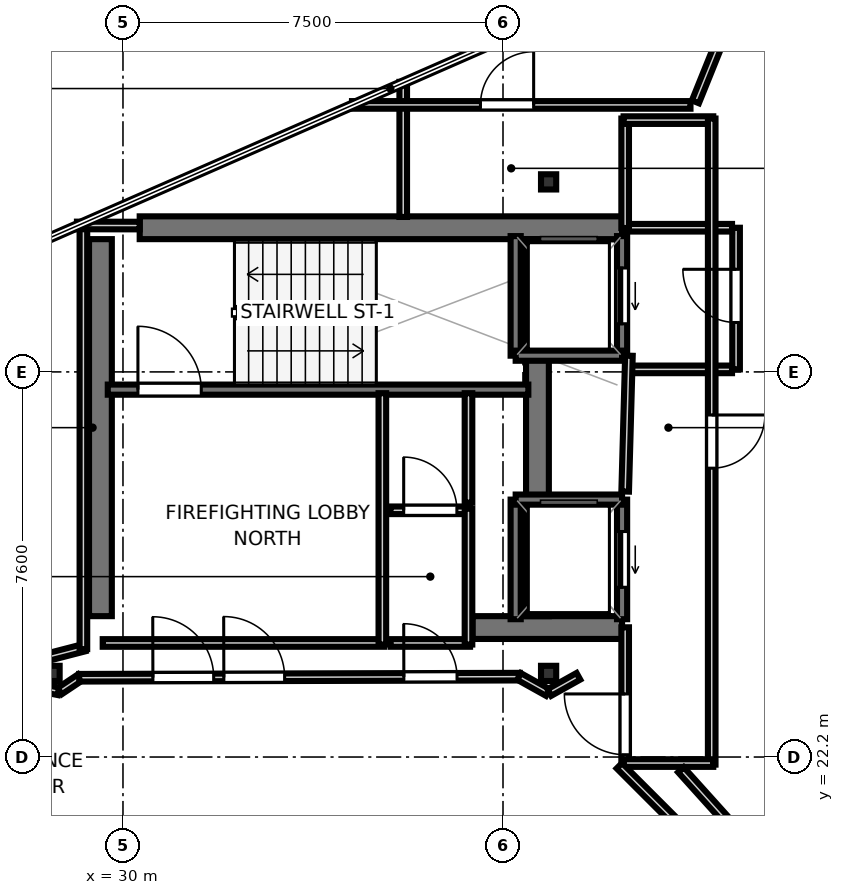
"""IFC4 building model, lengths in metres.
Left out: names, types, materials, properties, quantities, classifications, styles, units other than length and angle.
Written with IfcOpenShell. Run it as: python <this file> out.ifc"""

import sys

from ifc_helpers import new_model, si_unit, direction, frame, frame_2d, origin, origin_2d, place, context, subcontext, project, spatial, rectangle, i_section, extrude, element, fill, save


model = new_model("IFC4")
c1 = context("Model", 3, precision=1e-05, world=origin(), true_north=direction((0.0, 1.0)))
c2 = subcontext(c1, "Body", "Model", "MODEL_VIEW")
j1 = project(units=[si_unit("LENGTHUNIT", "METRE"), si_unit("PLANEANGLEUNIT", "RADIAN")], contexts=[c1])
p1 = place(None, origin())
s1 = spatial("IfcSite", under=j1, at=p1, CompositionType="ELEMENT")
p2 = place(p1, origin())
s2 = spatial("IfcBuilding", under=s1, at=p2, CompositionType="ELEMENT")
p3 = place(p2, frame((0.0, 0.0, 367.55)))
s3 = spatial("IfcBuildingStorey", under=s2, at=p3, CompositionType="ELEMENT", Elevation=367.55)
p4 = place(p3, frame((30.33, 32.645, 0.0), z_axis=(0.0, 0.0, 1.0), x_axis=(1.0, 0.0, 0.0)))
e1 = element("IfcWall", 1, at=p4, inside=s3, PredefinedType="SHEAR", context=c2, shape_type="SweptSolid", body=[
    extrude(rectangle(XDim=9.52, YDim=0.45, at=frame_2d((4.76, 0.0))), origin(), (0.0, 0.0, 1.0), 3.55),
])
p5 = place(p3, frame((36.9, 24.755, 0.0), z_axis=(0.0, 0.0, 1.0), x_axis=(1.0, 0.0, 0.0)))
e2 = element("IfcWall", 2, at=p5, inside=s3, PredefinedType="SHEAR", context=c2, shape_type="SweptSolid", body=[
    extrude(rectangle(XDim=2.95, YDim=0.45, at=frame_2d((1.475, 0.0))), origin(), (0.0, 0.0, 1.0), 3.55),
])
for number, where, z_axis, x_axis in (
    (3, (29.555, 24.98, 0.0), (0.0, 0.0, 1.0), (0.0, 1.0, 0.0)),
    (4, (38.18, 24.98, 0.0), (0.0, 0.0, 1.0), (0.0, 1.0, 0.0)),
):
    element("IfcWall", number, at=place(p3, frame(where, z_axis=z_axis, x_axis=x_axis)), inside=s3, PredefinedType="SHEAR", context=c2, shape_type="SweptSolid", body=[
        extrude(rectangle(XDim=7.44, YDim=0.45, at=frame_2d((3.72, 0.0))), origin(), (0.0, 0.0, 1.0), 3.55),
    ])
for number, where, z_axis, x_axis in (
    (5, (28.6, 23.85, 0.0), (0.0, 0.0, 1.0), (1.0, 0.0, 0.0)),
    (6, (38.4, 33.55, 0.0), (0.0, 0.0, 1.0), (1.0, 0.0, 0.0)),
    (7, (38.4, 23.85, 0.0), (0.0, 0.0, 1.0), (1.0, 0.0, 0.0)),
):
    element("IfcColumn", number, at=place(p3, frame(where, z_axis=z_axis, x_axis=x_axis)), inside=s3, PredefinedType="COLUMN", context=c2, shape_type="SweptSolid", body=[
        extrude(i_section(OverallWidth=0.3, OverallDepth=0.3, WebThickness=0.01, FlangeThickness=0.015, at=origin_2d()), origin(), (0.0, 0.0, 1.0), 3.75),
    ])
p6 = place(p3, frame((29.7, 29.45, 0.0), z_axis=(0.0, 0.0, 1.0), x_axis=(1.0, 0.0, 0.0)))
e8 = element("IfcWall", 8, at=p6, inside=s3, PredefinedType="SOLIDWALL", context=c2, shape_type="SweptSolid", body=[
    extrude(rectangle(XDim=8.3, YDim=0.2, at=frame_2d((4.15, 0.0))), origin(), (0.0, 0.0, 1.0), 3.55),
])
p7 = place(p6, frame((0.595, 0.0, 0.0)))
e9 = element("IfcOpeningElement", 9, at=p7, cuts=e8, PredefinedType="OPENING", context=c2, shape_type="SweptSolid", body=[
    extrude(rectangle(XDim=1.25, YDim=2.15, at=frame_2d((0.625, 1.075))), frame((0.0, 0.11, 0.0), z_axis=(0.0, -1.0, 0.0), x_axis=(1.0, 0.0, 0.0)), (0.0, 0.0, 1.0), 0.22),
])
p8 = place(p3, frame((39.85, 30.12, 0.0), z_axis=(0.0, 0.0, 1.0), x_axis=(0.0, 1.0, 0.0)))
e10 = element("IfcWall", 10, at=p8, inside=s3, PredefinedType="SOLIDWALL", context=c2, shape_type="SweptSolid", body=[
    extrude(rectangle(XDim=2.36, YDim=0.2, at=frame_2d((1.18, 0.0))), origin(), (0.0, 0.0, 1.0), 3.55),
])
p9 = place(p8, frame((0.63, 0.0, 0.0)))
e11 = element("IfcOpeningElement", 11, at=p9, cuts=e10, PredefinedType="OPENING", context=c2, shape_type="SweptSolid", body=[
    extrude(rectangle(XDim=1.1, YDim=2.15, at=frame_2d((0.55, 1.075))), frame((0.0, 0.11, 0.0), z_axis=(0.0, -1.0, 0.0), x_axis=(1.0, 0.0, 0.0)), (0.0, 0.0, 1.0), 0.22),
])
p10 = place(p3, frame((37.75, 30.12, 0.0), z_axis=(0.0, 0.0, 1.0), x_axis=(0.0, 1.0, 0.0)))
e12 = element("IfcWall", 12, at=p10, inside=s3, PredefinedType="SOLIDWALL", context=c2, shape_type="SweptSolid", body=[
    extrude(rectangle(XDim=2.36, YDim=0.2, at=frame_2d((1.18, 0.0))), origin(), (0.0, 0.0, 1.0), 3.55),
])
p11 = place(p3, frame((37.75, 30.12, 0.0), z_axis=(0.0, 0.0, 1.0), x_axis=(1.0, 0.0, 0.0)))
e13 = element("IfcWall", 13, at=p11, inside=s3, PredefinedType="SOLIDWALL", context=c2, shape_type="SweptSolid", body=[
    extrude(rectangle(XDim=2.1, YDim=0.2, at=frame_2d((1.05, 0.0))), origin(), (0.0, 0.0, 1.0), 3.55),
])
p12 = place(p3, frame((39.85, 24.92, 0.0), z_axis=(0.0, 0.0, 1.0), x_axis=(0.0, 1.0, 0.0)))
e14 = element("IfcWall", 14, at=p12, inside=s3, PredefinedType="SOLIDWALL", context=c2, shape_type="SweptSolid", body=[
    extrude(rectangle(XDim=2.36, YDim=0.2, at=frame_2d((1.18, 0.0))), origin(), (0.0, 0.0, 1.0), 3.55),
])
p13 = place(p12, frame((0.63, 0.0, 0.0)))
e15 = element("IfcOpeningElement", 15, at=p13, cuts=e14, PredefinedType="OPENING", context=c2, shape_type="SweptSolid", body=[
    extrude(rectangle(XDim=1.1, YDim=2.15, at=frame_2d((0.55, 1.075))), frame((0.0, 0.11, 0.0), z_axis=(0.0, -1.0, 0.0), x_axis=(1.0, 0.0, 0.0)), (0.0, 0.0, 1.0), 0.22),
])
p14 = place(p3, frame((37.75, 24.92, 0.0), z_axis=(0.0, 0.0, 1.0), x_axis=(0.0, 1.0, 0.0)))
e16 = element("IfcWall", 16, at=p14, inside=s3, PredefinedType="SOLIDWALL", context=c2, shape_type="SweptSolid", body=[
    extrude(rectangle(XDim=2.36, YDim=0.2, at=frame_2d((1.18, 0.0))), origin(), (0.0, 0.0, 1.0), 3.55),
])
p15 = place(p3, frame((37.75, 27.28, 0.0), z_axis=(0.0, 0.0, 1.0), x_axis=(1.0, 0.0, 0.0)))
e17 = element("IfcWall", 17, at=p15, inside=s3, PredefinedType="SOLIDWALL", context=c2, shape_type="SweptSolid", body=[
    extrude(rectangle(XDim=2.1, YDim=0.2, at=frame_2d((1.05, 0.0))), origin(), (0.0, 0.0, 1.0), 3.55),
])
p16 = place(p3, frame((42.1, 29.85, 0.0), z_axis=(0.0, 0.0, 1.0), x_axis=(0.0, 1.0, 0.0)))
e18 = element("IfcWall", 18, at=p16, inside=s3, PredefinedType="PARTITIONING", context=c2, shape_type="SweptSolid", body=[
    extrude(rectangle(XDim=2.795, YDim=0.15, at=frame_2d((1.397, 0.0))), origin(), (0.0, 0.0, 1.0), 2.87),
])
p17 = place(p16, frame((0.925, 0.0, 0.0)))
e19 = element("IfcOpeningElement", 19, at=p17, cuts=e18, PredefinedType="OPENING", context=c2, shape_type="SweptSolid", body=[
    extrude(rectangle(XDim=1.05, YDim=2.15, at=frame_2d((0.525, 1.075))), frame((0.0, 0.085, 0.0), z_axis=(0.0, -1.0, 0.0), x_axis=(1.0, 0.0, 0.0)), (0.0, 0.0, 1.0), 0.17),
])
for number, where, z_axis, x_axis in (
    (20, (39.96, 29.85, 0.0), (0.0, 0.0, 1.0), (1.0, 0.0, 0.0)),
    (21, (39.96, 32.645, 0.0), (0.0, 0.0, 1.0), (1.0, 0.0, 0.0)),
):
    element("IfcWall", number, at=place(p3, frame(where, z_axis=z_axis, x_axis=x_axis)), inside=s3, PredefinedType="PARTITIONING", context=c2, shape_type="SweptSolid", body=[
        extrude(rectangle(XDim=2.06, YDim=0.15, at=frame_2d((1.03, 0.0))), origin(), (0.0, 0.0, 1.0), 2.87),
    ])
p18 = place(p3, frame((35.15, 24.451, 0.0), z_axis=(0.0, 0.0, 1.0), x_axis=(-1.0, 0.0, 0.0)))
e22 = element("IfcWall", 22, at=p18, inside=s3, PredefinedType="PARTITIONING", context=c2, shape_type="SweptSolid", body=[
    extrude(rectangle(XDim=5.55, YDim=0.15, at=frame_2d((2.775, 0.0))), origin(), (0.0, 0.0, 1.0), 2.87),
])
p19 = place(p3, frame((35.119, 29.38, 0.0), z_axis=(0.0, 0.0, 1.0), x_axis=(0.0, -1.0, 0.0)))
e23 = element("IfcWall", 23, at=p19, inside=s3, PredefinedType="PARTITIONING", context=c2, shape_type="SweptSolid", body=[
    extrude(rectangle(XDim=4.96, YDim=0.15, at=frame_2d((2.48, 0.0))), origin(), (0.0, 0.0, 1.0), 2.08),
])
p20 = place(p3, frame((39.911, 22.05, 0.0), z_axis=(0.0, 0.0, 1.0), x_axis=(0.0, 1.0, 0.0)))
e24 = element("IfcWall", 24, at=p20, inside=s3, PredefinedType="PARTITIONING", context=c2, shape_type="SweptSolid", body=[
    extrude(rectangle(XDim=2.71, YDim=0.15, at=frame_2d((1.355, 0.0))), origin(), (0.0, 0.0, 1.0), 2.87),
])
p21 = place(p20, frame((0.195, 0.0, 0.0)))
e25 = element("IfcOpeningElement", 25, at=p21, cuts=e24, PredefinedType="OPENING", context=c2, shape_type="SweptSolid", body=[
    extrude(rectangle(XDim=1.2, YDim=2.15, at=frame_2d((0.6, 1.075))), frame((0.0, 0.085, 0.0), z_axis=(0.0, -1.0, 0.0), x_axis=(1.0, 0.0, 0.0)), (0.0, 0.0, 1.0), 0.17),
])
p22 = place(p3, frame((39.911, 27.439, 0.0), z_axis=(0.0, 0.0, 1.0), x_axis=(0.027673579092, 0.999617013171, 0.0)))
e26 = element("IfcWall", 26, at=p22, inside=s3, PredefinedType="PARTITIONING", context=c2, shape_type="SweptSolid", body=[
    extrude(rectangle(XDim=2.682, YDim=0.15, at=frame_2d((1.341, 0.0))), origin(), (0.0, 0.0, 1.0), 2.87),
])
p23 = place(p3, frame((39.911, 32.64, 0.0), z_axis=(0.0, 0.0, 1.0), x_axis=(0.0, 1.0, 0.0)))
e27 = element("IfcWall", 27, at=p23, inside=s3, PredefinedType="PARTITIONING", context=c2, shape_type="SweptSolid", body=[
    extrude(rectangle(XDim=2.16, YDim=0.15, at=frame_2d((1.08, 0.0))), origin(), (0.0, 0.0, 1.0), 2.87),
])
p24 = place(p3, frame((39.88, 34.769, 0.0), z_axis=(0.0, 0.0, 1.0), x_axis=(1.0, 0.0, 0.0)))
e28 = element("IfcWall", 28, at=p24, inside=s3, PredefinedType="PARTITIONING", context=c2, shape_type="SweptSolid", body=[
    extrude(rectangle(XDim=1.77, YDim=0.15, at=frame_2d((0.885, 0.0))), origin(), (0.0, 0.0, 1.0), 2.87),
])
p25 = place(p3, frame((41.619, 34.8, 0.0), z_axis=(0.0, 0.0, 1.0), x_axis=(0.0, -1.0, 0.0)))
e29 = element("IfcWall", 29, at=p25, inside=s3, PredefinedType="PARTITIONING", context=c2, shape_type="SweptSolid", body=[
    extrude(rectangle(XDim=12.75, YDim=0.15, at=frame_2d((6.375, 0.0))), origin(), (0.0, 0.0, 1.0), 2.87),
])
p26 = place(p25, frame((5.85, 0.0, 0.0)))
e30 = element("IfcOpeningElement", 30, at=p26, cuts=e29, PredefinedType="OPENING", context=c2, shape_type="SweptSolid", body=[
    extrude(rectangle(XDim=1.05, YDim=2.15, at=frame_2d((0.525, 1.075))), frame((0.0, 0.085, 0.0), z_axis=(0.0, -1.0, 0.0), x_axis=(1.0, 0.0, 0.0)), (0.0, 0.0, 1.0), 0.17),
])
p27 = place(p3, frame((41.65, 22.081, 0.0), z_axis=(0.0, 0.0, 1.0), x_axis=(-1.0, 0.0, 0.0)))
e31 = element("IfcWall", 31, at=p27, inside=s3, PredefinedType="PARTITIONING", context=c2, shape_type="SweptSolid", body=[
    extrude(rectangle(XDim=1.77, YDim=0.15, at=frame_2d((0.885, 0.0))), origin(), (0.0, 0.0, 1.0), 2.87),
])
p28 = place(p3, frame((36.85, 24.451, 0.0), z_axis=(0.0, 0.0, 1.0), x_axis=(-1.0, 0.0, 0.0)))
e32 = element("IfcWall", 32, at=p28, inside=s3, PredefinedType="PARTITIONING", context=c2, shape_type="SweptSolid", body=[
    extrude(rectangle(XDim=1.57, YDim=0.15, at=frame_2d((0.785, 0.0))), origin(), (0.0, 0.0, 1.0), 2.87),
])
p29 = place(p3, frame((35.28, 27.069, 0.0), z_axis=(0.0, 0.0, 1.0), x_axis=(1.0, 0.0, 0.0)))
e33 = element("IfcWall", 33, at=p29, inside=s3, PredefinedType="PARTITIONING", context=c2, shape_type="SweptSolid", body=[
    extrude(rectangle(XDim=1.57, YDim=0.15, at=frame_2d((0.785, 0.0))), origin(), (0.0, 0.0, 1.0), 2.87),
])
p30 = place(p29, frame((0.26, 0.0, 0.0)))
e34 = element("IfcOpeningElement", 34, at=p30, cuts=e33, PredefinedType="OPENING", context=c2, shape_type="SweptSolid", body=[
    extrude(rectangle(XDim=1.05, YDim=2.15, at=frame_2d((0.525, 1.075))), frame((0.0, 0.085, 0.0), z_axis=(0.0, -1.0, 0.0), x_axis=(1.0, 0.0, 0.0)), (0.0, 0.0, 1.0), 0.17),
])
p31 = place(p3, frame((36.819, 27.1, 0.0), z_axis=(0.0, 0.0, 1.0), x_axis=(0.0, -1.0, 0.0)))
e35 = element("IfcWall", 35, at=p31, inside=s3, PredefinedType="PARTITIONING", context=c2, shape_type="SweptSolid", body=[
    extrude(rectangle(XDim=2.68, YDim=0.15, at=frame_2d((1.34, 0.0))), origin(), (0.0, 0.0, 1.0), 2.87),
])
p32 = place(p3, frame((36.819, 29.38, 0.0), z_axis=(0.0, 0.0, 1.0), x_axis=(0.0, -1.0, 0.0)))
e36 = element("IfcWall", 36, at=p32, inside=s3, PredefinedType="PARTITIONING", context=c2, shape_type="SweptSolid", body=[
    extrude(rectangle(XDim=2.16, YDim=0.15, at=frame_2d((1.08, 0.0))), origin(), (0.0, 0.0, 1.0), 2.87),
])
p33 = place(p3, frame((35.531, 32.858, 0.0), z_axis=(0.0, 0.0, 1.0), x_axis=(0.0, 1.0, 0.0)))
e37 = element("IfcWall", 37, at=p33, inside=s3, PredefinedType="PARTITIONING", context=c2, shape_type="SweptSolid", body=[
    extrude(rectangle(XDim=2.666, YDim=0.15, at=frame_2d((1.333, 0.0))), origin(), (0.0, 0.0, 1.0), 2.87),
])
p34 = place(p3, frame((34.52, 35.069, 0.0), z_axis=(0.0, 0.0, 1.0), x_axis=(1.0, 0.0, 0.0)))
e38 = element("IfcWall", 38, at=p34, inside=s3, PredefinedType="PARTITIONING", context=c2, shape_type="SweptSolid", body=[
    extrude(rectangle(XDim=6.68, YDim=0.15, at=frame_2d((3.34, 0.0))), origin(), (0.0, 0.0, 1.0), 2.87),
])
p35 = place(p34, frame((2.535, 0.0, 0.0)))
e39 = element("IfcOpeningElement", 39, at=p35, cuts=e38, PredefinedType="OPENING", context=c2, shape_type="SweptSolid", body=[
    extrude(rectangle(XDim=1.05, YDim=2.15, at=frame_2d((0.525, 1.075))), frame((0.0, 0.085, 0.0), z_axis=(0.0, -1.0, 0.0), x_axis=(1.0, 0.0, 0.0)), (0.0, 0.0, 1.0), 0.17),
])
p36 = place(p3, frame((29.242, 24.359, 0.0), z_axis=(0.0, 0.0, 1.0), x_axis=(-0.968190928123, -0.250212563035, 0.0)))
e40 = element("IfcWall", 40, at=p36, inside=s3, PredefinedType="PARTITIONING", context=c2, shape_type="SweptSolid", body=[
    extrude(rectangle(XDim=0.927, YDim=0.15, at=frame_2d((0.463, 0.0))), origin(), (0.0, 0.0, 1.0), 2.87),
])
p37 = place(p3, frame((28.346, 23.572, 0.0), z_axis=(0.0, 0.0, 1.0), x_axis=(0.980749356168, -0.19527083852, 0.0)))
e41 = element("IfcWall", 41, at=p37, inside=s3, PredefinedType="PARTITIONING", context=c2, shape_type="SweptSolid", body=[
    extrude(rectangle(XDim=0.389, YDim=0.15, at=frame_2d((0.194, 0.0))), origin(), (0.0, 0.0, 1.0), 2.87),
])
p38 = place(p3, frame((28.751, 23.501, 0.0), z_axis=(0.0, 0.0, 1.0), x_axis=(0.831506528289, 0.555514980368, 0.0)))
e42 = element("IfcWall", 42, at=p38, inside=s3, PredefinedType="PARTITIONING", context=c2, shape_type="SweptSolid", body=[
    extrude(rectangle(XDim=0.484, YDim=0.15, at=frame_2d((0.242, 0.0))), origin(), (0.0, 0.0, 1.0), 2.87),
])
p39 = place(p3, frame((29.136, 23.764, 0.0), z_axis=(0.0, 0.0, 1.0), x_axis=(0.999996877471, 0.002499009437, 0.0)))
e43 = element("IfcWall", 43, at=p39, inside=s3, PredefinedType="PARTITIONING", context=c2, shape_type="SweptSolid", body=[
    extrude(rectangle(XDim=8.695, YDim=0.15, at=frame_2d((4.347, 0.0))), origin(), (0.0, 0.0, 1.0), 2.87),
])
p40 = place(p39, frame((2.854, 0.0, 0.0)))
e44 = element("IfcOpeningElement", 44, at=p40, cuts=e43, PredefinedType="OPENING", context=c2, shape_type="SweptSolid", body=[
    extrude(rectangle(XDim=1.2, YDim=2.15, at=frame_2d((0.6, 1.075))), frame((0.0, 0.085, 0.0), z_axis=(0.0, -1.0, 0.0), x_axis=(1.0, 0.0, 0.0)), (0.0, 0.0, 1.0), 0.17),
])
p41 = place(p39, frame((6.407, 0.0, 0.0)))
e45 = element("IfcOpeningElement", 45, at=p41, cuts=e43, PredefinedType="OPENING", context=c2, shape_type="SweptSolid", body=[
    extrude(rectangle(XDim=1.05, YDim=2.15, at=frame_2d((0.525, 1.075))), frame((0.0, 0.085, 0.0), z_axis=(0.0, -1.0, 0.0), x_axis=(1.0, 0.0, 0.0)), (0.0, 0.0, 1.0), 0.17),
])
p42 = place(p39, frame((1.454, 0.0, 0.0)))
e46 = element("IfcOpeningElement", 46, at=p42, cuts=e43, PredefinedType="OPENING", context=c2, shape_type="SweptSolid", body=[
    extrude(rectangle(XDim=1.2, YDim=2.15, at=frame_2d((0.6, 1.075))), frame((0.0, 0.085, 0.0), z_axis=(0.0, -1.0, 0.0), x_axis=(1.0, 0.0, 0.0)), (0.0, 0.0, 1.0), 0.17),
])
p43 = place(p3, frame((37.816, 23.79, 0.0), z_axis=(0.0, 0.0, 1.0), x_axis=(0.873431330758, -0.486947338478, 0.0)))
e47 = element("IfcWall", 47, at=p43, inside=s3, PredefinedType="PARTITIONING", context=c2, shape_type="SweptSolid", body=[
    extrude(rectangle(XDim=0.651, YDim=0.15, at=frame_2d((0.326, 0.0))), origin(), (0.0, 0.0, 1.0), 2.87),
])
p44 = place(p3, frame((38.415, 23.473, 0.0), z_axis=(0.0, 0.0, 1.0), x_axis=(0.873120406102, 0.487504621976, 0.0)))
e48 = element("IfcWall", 48, at=p44, inside=s3, PredefinedType="PARTITIONING", context=c2, shape_type="SweptSolid", body=[
    extrude(rectangle(XDim=0.656, YDim=0.15, at=frame_2d((0.328, 0.0))), origin(), (0.0, 0.0, 1.0), 2.87),
])
p45 = place(p3, frame((39.796, 22.028, 0.0), z_axis=(0.0, 0.0, 1.0), x_axis=(0.707106781187, -0.707106781187, 0.0)))
e49 = element("IfcWall", 49, at=p45, inside=s3, PredefinedType="PARTITIONING", context=c2, shape_type="SweptSolid", body=[
    extrude(rectangle(XDim=2.051, YDim=0.15, at=frame_2d((1.025, 0.0))), origin(), (0.0, 0.0, 1.0), 2.87),
])
p46 = place(p3, frame((29.219, 32.757, 0.0), z_axis=(0.0, 0.0, 1.0), x_axis=(0.0, -1.0, 0.0)))
e50 = element("IfcWall", 50, at=p46, inside=s3, PredefinedType="PARTITIONING", context=c2, shape_type="SweptSolid", body=[
    extrude(rectangle(XDim=8.428, YDim=0.15, at=frame_2d((4.214, 0.0))), origin(), (0.0, 0.0, 1.0), 2.87),
])
p47 = place(p3, frame((41.011, 21.949, 0.0), z_axis=(0.0, 0.0, 1.0), x_axis=(0.669147587513, -0.743129535226, 0.0)))
e51 = element("IfcWall", 51, at=p47, inside=s3, PredefinedType="PARTITIONING", context=c2, shape_type="SweptSolid", body=[
    extrude(rectangle(XDim=5.679, YDim=0.15, at=frame_2d((2.84, 0.0))), origin(), (0.0, 0.0, 1.0), 2.87),
])
p48 = place(p3, frame((41.297, 35.129, 0.0), z_axis=(0.0, 0.0, 1.0), x_axis=(0.374615121192, 0.927180409076, 0.0)))
e52 = element("IfcWall", 52, at=p48, inside=s3, PredefinedType="PARTITIONING", context=c2, shape_type="SweptSolid", body=[
    extrude(rectangle(XDim=3.822, YDim=0.15, at=frame_2d((1.911, 0.0))), origin(), (0.0, 0.0, 1.0), 2.87),
])
p49 = place(p48, frame((1.386, 0.0, 0.0)))
e53 = element("IfcOpeningElement", 53, at=p49, cuts=e52, PredefinedType="OPENING", context=c2, shape_type="SweptSolid", body=[
    extrude(rectangle(XDim=1.05, YDim=2.15, at=frame_2d((0.525, 1.075))), frame((0.0, 0.085, 0.0), z_axis=(0.0, -1.0, 0.0), x_axis=(1.0, 0.0, 0.0)), (0.0, 0.0, 1.0), 0.17),
])
p50 = place(p3, frame((30.33, 32.688, 0.0), z_axis=(0.0, 0.0, 1.0), x_axis=(-0.999998426292, 0.001774095375, 0.0)))
e54 = element("IfcWall", 54, at=p50, inside=s3, PredefinedType="PARTITIONING", context=c2, shape_type="SweptSolid", body=[
    extrude(rectangle(XDim=1.239, YDim=0.15, at=frame_2d((0.619, 0.0))), origin(), (0.0, 0.0, 1.0), 2.87),
])
p51 = place(p7, origin())
e55 = element("IfcDoor", 55, at=p51, inside=s3, OperationType="SINGLE_SWING_LEFT", PredefinedType="DOOR", context=c2, shape_type="SweptSolid", body=[
    extrude(rectangle(XDim=1.25, YDim=2.15, at=frame_2d((0.625, 1.075))), frame((0.0, 0.025, 0.0), z_axis=(0.0, -1.0, 0.0), x_axis=(1.0, 0.0, 0.0)), (0.0, 0.0, 1.0), 0.05),
])
fill(e9, e55)
p52 = place(p9, origin())
e56 = element("IfcDoor", 56, at=p52, inside=s3, OperationType="SLIDING_TO_LEFT", PredefinedType="DOOR", context=c2, shape_type="SweptSolid", body=[
    extrude(rectangle(XDim=1.1, YDim=2.15, at=frame_2d((0.55, 1.075))), frame((0.0, 0.025, 0.0), z_axis=(0.0, -1.0, 0.0), x_axis=(1.0, 0.0, 0.0)), (0.0, 0.0, 1.0), 0.05),
])
fill(e11, e56)
p53 = place(p13, origin())
e57 = element("IfcDoor", 57, at=p53, inside=s3, OperationType="SLIDING_TO_LEFT", PredefinedType="DOOR", context=c2, shape_type="SweptSolid", body=[
    extrude(rectangle(XDim=1.1, YDim=2.15, at=frame_2d((0.55, 1.075))), frame((0.0, 0.025, 0.0), z_axis=(0.0, -1.0, 0.0), x_axis=(1.0, 0.0, 0.0)), (0.0, 0.0, 1.0), 0.05),
])
fill(e15, e57)
p54 = place(p17, origin())
e58 = element("IfcDoor", 58, at=p54, inside=s3, OperationType="SINGLE_SWING_RIGHT", PredefinedType="DOOR", context=c2, shape_type="SweptSolid", body=[
    extrude(rectangle(XDim=1.05, YDim=2.15, at=frame_2d((0.525, 1.075))), frame((0.0, 0.025, 0.0), z_axis=(0.0, -1.0, 0.0), x_axis=(1.0, 0.0, 0.0)), (0.0, 0.0, 1.0), 0.05),
])
fill(e19, e58)
p55 = place(p40, origin())
e59 = element("IfcDoor", 59, at=p55, inside=s3, OperationType="SINGLE_SWING_LEFT", PredefinedType="DOOR", context=c2, shape_type="SweptSolid", body=[
    extrude(rectangle(XDim=1.2, YDim=2.15, at=frame_2d((0.6, 1.075))), frame((0.0, 0.025, 0.0), z_axis=(0.0, -1.0, 0.0), x_axis=(1.0, 0.0, 0.0)), (0.0, 0.0, 1.0), 0.05),
])
fill(e44, e59)
p56 = place(p21, origin())
e60 = element("IfcDoor", 60, at=p56, inside=s3, OperationType="SINGLE_SWING_RIGHT", PredefinedType="DOOR", context=c2, shape_type="SweptSolid", body=[
    extrude(rectangle(XDim=1.2, YDim=2.15, at=frame_2d((0.6, 1.075))), frame((0.0, 0.025, 0.0), z_axis=(0.0, -1.0, 0.0), x_axis=(1.0, 0.0, 0.0)), (0.0, 0.0, 1.0), 0.05),
])
fill(e25, e60)
p57 = place(p41, origin())
e61 = element("IfcDoor", 61, at=p57, inside=s3, OperationType="SINGLE_SWING_LEFT", PredefinedType="DOOR", context=c2, shape_type="SweptSolid", body=[
    extrude(rectangle(XDim=1.05, YDim=2.15, at=frame_2d((0.525, 1.075))), frame((0.0, 0.025, 0.0), z_axis=(0.0, -1.0, 0.0), x_axis=(1.0, 0.0, 0.0)), (0.0, 0.0, 1.0), 0.05),
])
fill(e45, e61)
p58 = place(p30, origin())
e62 = element("IfcDoor", 62, at=p58, inside=s3, OperationType="SINGLE_SWING_LEFT", PredefinedType="DOOR", context=c2, shape_type="SweptSolid", body=[
    extrude(rectangle(XDim=1.05, YDim=2.15, at=frame_2d((0.525, 1.075))), frame((0.0, 0.025, 0.0), z_axis=(0.0, -1.0, 0.0), x_axis=(1.0, 0.0, 0.0)), (0.0, 0.0, 1.0), 0.05),
])
fill(e34, e62)
p59 = place(p42, origin())
e63 = element("IfcDoor", 63, at=p59, inside=s3, OperationType="SINGLE_SWING_LEFT", PredefinedType="DOOR", context=c2, shape_type="SweptSolid", body=[
    extrude(rectangle(XDim=1.2, YDim=2.15, at=frame_2d((0.6, 1.075))), frame((0.0, 0.025, 0.0), z_axis=(0.0, -1.0, 0.0), x_axis=(1.0, 0.0, 0.0)), (0.0, 0.0, 1.0), 0.05),
])
fill(e46, e63)
p60 = place(p26, origin())
e64 = element("IfcDoor", 64, at=p60, inside=s3, OperationType="SINGLE_SWING_LEFT", PredefinedType="DOOR", context=c2, shape_type="SweptSolid", body=[
    extrude(rectangle(XDim=1.05, YDim=2.15, at=frame_2d((0.525, 1.075))), frame((0.0, 0.025, 0.0), z_axis=(0.0, -1.0, 0.0), x_axis=(1.0, 0.0, 0.0)), (0.0, 0.0, 1.0), 0.05),
])
fill(e30, e64)
p61 = place(p35, origin())
e65 = element("IfcDoor", 65, at=p61, inside=s3, OperationType="SINGLE_SWING_RIGHT", PredefinedType="DOOR", context=c2, shape_type="SweptSolid", body=[
    extrude(rectangle(XDim=1.05, YDim=2.15, at=frame_2d((0.525, 1.075))), frame((0.0, 0.025, 0.0), z_axis=(0.0, -1.0, 0.0), x_axis=(1.0, 0.0, 0.0)), (0.0, 0.0, 1.0), 0.05),
])
fill(e39, e65)
save(model, sys.argv[1])
